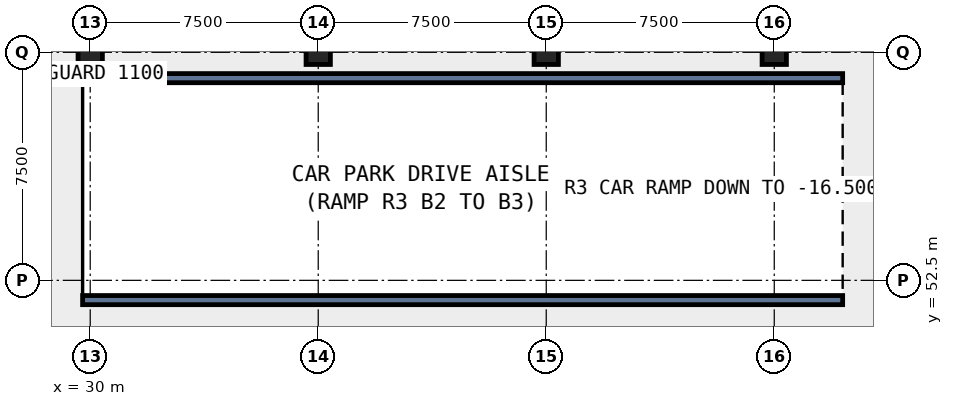
"""IFC4 building model, lengths in metres.
Left out: names, types, materials, properties, quantities, classifications, styles, units other than length and angle.
Written with IfcOpenShell. Run it as: python <this file> out.ifc"""

import sys

from ifc_helpers import new_model, si_unit, direction, frame, frame_2d, origin, origin_2d, place, context, subcontext, project, spatial, rectangle, extrude, element, save


model = new_model("IFC4")
c1 = context("Model", 3, precision=1e-05, world=origin(), true_north=direction((0.0, 1.0)))
c2 = subcontext(c1, "Body", "Model", "MODEL_VIEW")
j1 = project(units=[si_unit("LENGTHUNIT", "METRE"), si_unit("PLANEANGLEUNIT", "RADIAN")], contexts=[c1])
p1 = place(None, origin())
s1 = spatial("IfcSite", under=j1, at=p1, CompositionType="ELEMENT")
p2 = place(p1, origin())
s2 = spatial("IfcBuilding", under=s1, at=p2, CompositionType="ELEMENT")
p3 = place(p2, frame((0.0, 0.0, -11.0)))
s3 = spatial("IfcBuildingStorey", under=s2, at=p3, CompositionType="ELEMENT", Elevation=-11.0)
for number, where, z_axis, x_axis in (
    (1, (30.0, 60.0, -0.42), (0.0, 0.0, 1.0), (1.0, 0.0, 0.0)),
    (2, (37.5, 60.0, -0.42), (0.0, 0.0, 1.0), (1.0, 0.0, 0.0)),
    (3, (45.0, 60.0, -0.42), (0.0, 0.0, 1.0), (1.0, 0.0, 0.0)),
    (4, (52.5, 60.0, -0.42), (0.0, 0.0, 1.0), (1.0, 0.0, 0.0)),
):
    element("IfcColumn", number, at=place(p3, frame(where, z_axis=z_axis, x_axis=x_axis)), inside=s3, PredefinedType="COLUMN", context=c2, shape_type="SweptSolid", body=[
        extrude(rectangle(XDim=0.8, YDim=0.8, at=origin_2d()), origin(), (0.0, 0.0, 1.0), 5.5),
    ])
for number, where, z_axis, x_axis in (
    (5, (29.75, 51.85, 0.0), (0.0, 0.0, 1.0), (1.0, 0.0, 0.0)),
    (6, (29.75, 59.15, 0.0), (0.0, 0.0, 1.0), (1.0, 0.0, 0.0)),
):
    element("IfcWall", number, at=place(p3, frame(where, z_axis=z_axis, x_axis=x_axis)), inside=s3, PredefinedType="SOLIDWALL", context=c2, shape_type="SweptSolid", body=[
        extrude(rectangle(XDim=25.0, YDim=0.3, at=frame_2d((12.5, 0.0))), origin(), (0.0, 0.0, 1.0), 1.1),
    ])
save(model, sys.argv[1])
